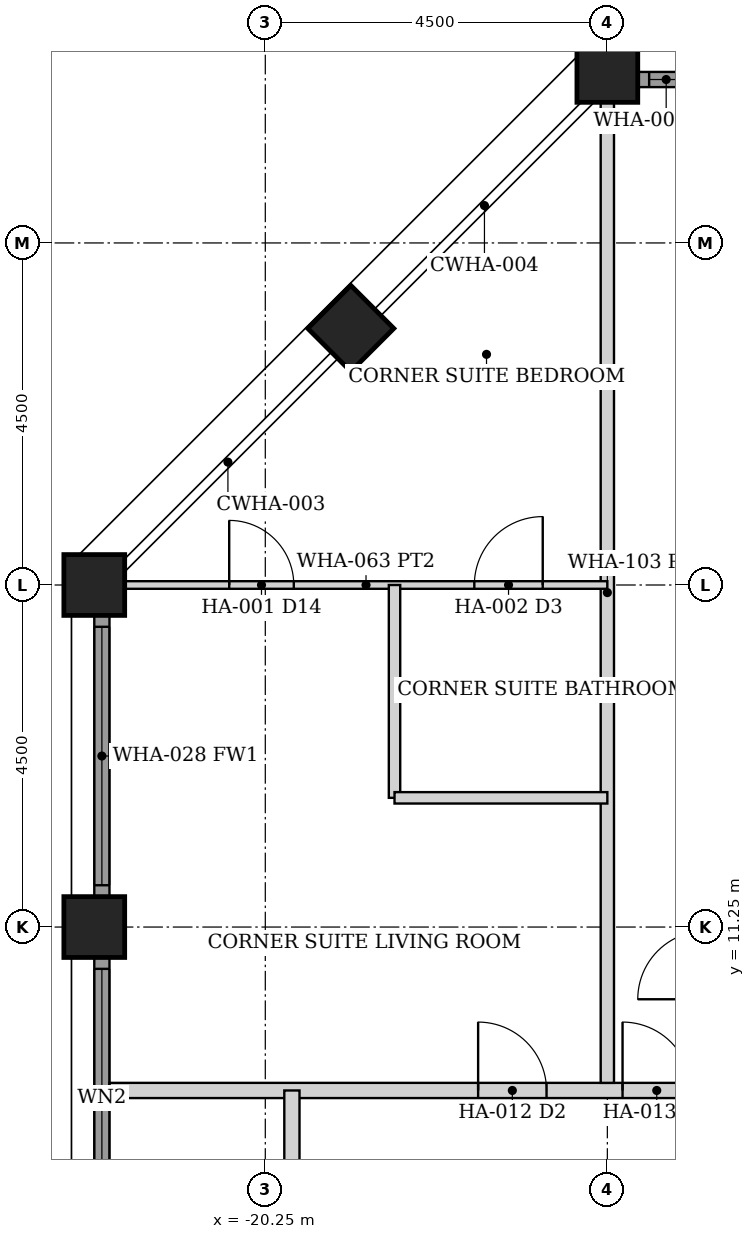
"""IFC4 building model, lengths in metres.
Left out: names, types, materials, properties, quantities, classifications, styles, units other than length and angle.
Written with IfcOpenShell. Run it as: python <this file> out.ifc"""

import sys

from ifc_helpers import new_model, si_unit, direction, frame, frame_2d, origin, origin_2d, place, context, subcontext, project, spatial, rectangle, hollow_rectangle, extrude, element, fill, save


model = new_model("IFC4")
c1 = context("Model", 3, precision=1e-05, world=origin(), true_north=direction((0.0, 1.0)))
c2 = subcontext(c1, "Body", "Model", "MODEL_VIEW")
j1 = project(units=[si_unit("LENGTHUNIT", "METRE"), si_unit("PLANEANGLEUNIT", "RADIAN")], contexts=[c1])
p1 = place(None, origin())
s1 = spatial("IfcSite", under=j1, at=p1, CompositionType="ELEMENT")
p2 = place(p1, origin())
s2 = spatial("IfcBuilding", under=s1, at=p2, CompositionType="ELEMENT")
p3 = place(p2, frame((0.0, 0.0, 118.4)))
s3 = spatial("IfcBuildingStorey", under=s2, at=p3, CompositionType="ELEMENT", Elevation=118.4)
for number, where, z_axis, x_axis in (
    (1, (-15.75, 22.5, 0.0), (0.0, 0.0, 1.0), (0.0, 1.0, 0.0)),
    (2, (-22.5, 11.25, 0.0), (0.0, 0.0, 1.0), (1.0, 0.0, 0.0)),
    (3, (-22.5, 15.75, 0.0), (0.0, 0.0, 1.0), (1.0, 0.0, 0.0)),
    (4, (-19.125, 19.125, 0.0), (0.0, 0.0, 1.0), (0.707, -0.707, 0.0)),
):
    element("IfcColumn", number, at=place(p3, frame(where, z_axis=z_axis, x_axis=x_axis)), inside=s3, PredefinedType="COLUMN", context=c2, shape_type="SweptSolid", body=[
        extrude(hollow_rectangle(XDim=0.8, YDim=0.8, WallThickness=0.06, at=origin_2d()), origin(), (0.0, 0.0, 1.0), 3.6),
    ])
p4 = place(p3, frame((-15.345, 22.4, 0.0), z_axis=(0.0, 0.0, 1.0), x_axis=(1.0, 0.0, 0.0)))
e5 = element("IfcWall", 5, at=p4, inside=s3, PredefinedType="SOLIDWALL", context=c2, shape_type="SweptSolid", body=[
    extrude(rectangle(XDim=3.69, YDim=0.2, at=frame_2d((1.845, 0.0))), origin(), (0.0, 0.0, 1.0), 2.479),
])
p5 = place(p4, frame((0.145, 0.0, 0.3)))
e6 = element("IfcOpeningElement", 6, at=p5, cuts=e5, PredefinedType="OPENING", context=c2, shape_type="SweptSolid", body=[
    extrude(rectangle(XDim=3.4, YDim=2.029, at=frame_2d((1.7, 1.015))), frame((0.0, 0.11, 0.0), z_axis=(0.0, -1.0, 0.0), x_axis=(1.0, 0.0, 0.0)), (0.0, 0.0, 1.0), 0.22),
])
p6 = place(p3, frame((-22.4, 7.155, 0.0), z_axis=(0.0, 0.0, 1.0), x_axis=(0.0, 1.0, 0.0)))
e7 = element("IfcWall", 7, at=p6, inside=s3, PredefinedType="SOLIDWALL", context=c2, shape_type="SweptSolid", body=[
    extrude(rectangle(XDim=3.69, YDim=0.2, at=frame_2d((1.845, 0.0))), origin(), (0.0, 0.0, 1.0), 2.479),
])
p7 = place(p6, frame((0.145, 0.0, 0.3)))
e8 = element("IfcOpeningElement", 8, at=p7, cuts=e7, PredefinedType="OPENING", context=c2, shape_type="SweptSolid", body=[
    extrude(rectangle(XDim=3.4, YDim=2.029, at=frame_2d((1.7, 1.015))), frame((0.0, 0.11, 0.0), z_axis=(0.0, -1.0, 0.0), x_axis=(1.0, 0.0, 0.0)), (0.0, 0.0, 1.0), 0.22),
])
p8 = place(p3, frame((-22.4, 11.655, 0.0), z_axis=(0.0, 0.0, 1.0), x_axis=(0.0, 1.0, 0.0)))
e9 = element("IfcWall", 9, at=p8, inside=s3, PredefinedType="SOLIDWALL", context=c2, shape_type="SweptSolid", body=[
    extrude(rectangle(XDim=3.69, YDim=0.2, at=frame_2d((1.845, 0.0))), origin(), (0.0, 0.0, 1.0), 2.479),
])
p9 = place(p8, frame((0.145, 0.0, 0.3)))
e10 = element("IfcOpeningElement", 10, at=p9, cuts=e9, PredefinedType="OPENING", context=c2, shape_type="SweptSolid", body=[
    extrude(rectangle(XDim=3.4, YDim=2.029, at=frame_2d((1.7, 1.015))), frame((0.0, 0.11, 0.0), z_axis=(0.0, -1.0, 0.0), x_axis=(1.0, 0.0, 0.0)), (0.0, 0.0, 1.0), 0.22),
])
p10 = place(p3, frame((-22.3, 9.1, 0.0), z_axis=(0.0, 0.0, 1.0), x_axis=(1.0, 0.0, 0.0)))
e11 = element("IfcWall", 11, at=p10, inside=s3, PredefinedType="PARTITIONING", context=c2, shape_type="SweptSolid", body=[
    extrude(rectangle(XDim=44.6, YDim=0.2, at=frame_2d((22.3, 0.0))), origin(), (0.0, 0.0, 1.0), 2.473),
])
p11 = place(p10, frame((6.75, 0.0, 0.0)))
e12 = element("IfcOpeningElement", 12, at=p11, cuts=e11, PredefinedType="OPENING", context=c2, shape_type="SweptSolid", body=[
    extrude(rectangle(XDim=0.9, YDim=2.1, at=frame_2d((0.45, 1.05))), frame((0.0, 0.11, 0.0), z_axis=(0.0, -1.0, 0.0), x_axis=(1.0, 0.0, 0.0)), (0.0, 0.0, 1.0), 0.22),
])
p12 = place(p10, frame((11.25, 0.0, 0.0)))
e13 = element("IfcOpeningElement", 13, at=p12, cuts=e11, PredefinedType="OPENING", context=c2, shape_type="SweptSolid", body=[
    extrude(rectangle(XDim=0.9, YDim=2.1, at=frame_2d((0.45, 1.05))), frame((0.0, 0.11, 0.0), z_axis=(0.0, -1.0, 0.0), x_axis=(1.0, 0.0, 0.0)), (0.0, 0.0, 1.0), 0.22),
])
p13 = place(p10, frame((15.75, 0.0, 0.0)))
e14 = element("IfcOpeningElement", 14, at=p13, cuts=e11, PredefinedType="OPENING", context=c2, shape_type="SweptSolid", body=[
    extrude(rectangle(XDim=0.9, YDim=2.1, at=frame_2d((0.45, 1.05))), frame((0.0, 0.11, 0.0), z_axis=(0.0, -1.0, 0.0), x_axis=(1.0, 0.0, 0.0)), (0.0, 0.0, 1.0), 0.22),
])
p14 = place(p10, frame((20.25, 0.0, 0.0)))
e15 = element("IfcOpeningElement", 15, at=p14, cuts=e11, PredefinedType="OPENING", context=c2, shape_type="SweptSolid", body=[
    extrude(rectangle(XDim=0.9, YDim=2.1, at=frame_2d((0.45, 1.05))), frame((0.0, 0.11, 0.0), z_axis=(0.0, -1.0, 0.0), x_axis=(1.0, 0.0, 0.0)), (0.0, 0.0, 1.0), 0.22),
])
p15 = place(p10, frame((24.75, 0.0, 0.0)))
e16 = element("IfcOpeningElement", 16, at=p15, cuts=e11, PredefinedType="OPENING", context=c2, shape_type="SweptSolid", body=[
    extrude(rectangle(XDim=0.9, YDim=2.1, at=frame_2d((0.45, 1.05))), frame((0.0, 0.11, 0.0), z_axis=(0.0, -1.0, 0.0), x_axis=(1.0, 0.0, 0.0)), (0.0, 0.0, 1.0), 0.22),
])
p16 = place(p10, frame((29.25, 0.0, 0.0)))
e17 = element("IfcOpeningElement", 17, at=p16, cuts=e11, PredefinedType="OPENING", context=c2, shape_type="SweptSolid", body=[
    extrude(rectangle(XDim=0.9, YDim=2.1, at=frame_2d((0.45, 1.05))), frame((0.0, 0.11, 0.0), z_axis=(0.0, -1.0, 0.0), x_axis=(1.0, 0.0, 0.0)), (0.0, 0.0, 1.0), 0.22),
])
p17 = place(p10, frame((33.75, 0.0, 0.0)))
e18 = element("IfcOpeningElement", 18, at=p17, cuts=e11, PredefinedType="OPENING", context=c2, shape_type="SweptSolid", body=[
    extrude(rectangle(XDim=0.9, YDim=2.1, at=frame_2d((0.45, 1.05))), frame((0.0, 0.11, 0.0), z_axis=(0.0, -1.0, 0.0), x_axis=(1.0, 0.0, 0.0)), (0.0, 0.0, 1.0), 0.22),
])
p18 = place(p10, frame((38.85, 0.0, 0.0)))
e19 = element("IfcOpeningElement", 19, at=p18, cuts=e11, PredefinedType="OPENING", context=c2, shape_type="SweptSolid", body=[
    extrude(rectangle(XDim=0.9, YDim=2.1, at=frame_2d((0.45, 1.05))), frame((0.0, 0.11, 0.0), z_axis=(0.0, -1.0, 0.0), x_axis=(1.0, 0.0, 0.0)), (0.0, 0.0, 1.0), 0.22),
])
p19 = place(p10, frame((4.85, 0.0, 0.0)))
e20 = element("IfcOpeningElement", 20, at=p19, cuts=e11, PredefinedType="OPENING", context=c2, shape_type="SweptSolid", body=[
    extrude(rectangle(XDim=0.9, YDim=2.1, at=frame_2d((0.45, 1.05))), frame((0.0, 0.11, 0.0), z_axis=(0.0, -1.0, 0.0), x_axis=(1.0, 0.0, 0.0)), (0.0, 0.0, 1.0), 0.22),
])
p20 = place(p3, frame((-19.9, -9.1, 0.0), z_axis=(0.0, 0.0, 1.0), x_axis=(0.0, 1.0, 0.0)))
e21 = element("IfcWall", 21, at=p20, inside=s3, PredefinedType="PARTITIONING", context=c2, shape_type="SweptSolid", body=[
    extrude(rectangle(XDim=18.2, YDim=0.2, at=frame_2d((9.1, 0.0))), origin(), (0.0, 0.0, 1.0), 2.473),
])
p21 = place(p20, frame((8.6, 0.0, 0.0)))
e22 = element("IfcOpeningElement", 22, at=p21, cuts=e21, PredefinedType="OPENING", context=c2, shape_type="SweptSolid", body=[
    extrude(rectangle(XDim=1.0, YDim=2.1, at=frame_2d((0.5, 1.05))), frame((0.0, 0.11, 0.0), z_axis=(0.0, -1.0, 0.0), x_axis=(1.0, 0.0, 0.0)), (0.0, 0.0, 1.0), 0.22),
])
p22 = place(p3, frame((-15.75, 9.2, 0.0), z_axis=(0.0, 0.0, 1.0), x_axis=(0.0, 1.0, 0.0)))
e23 = element("IfcWall", 23, at=p22, inside=s3, PredefinedType="PARTITIONING", context=c2, shape_type="SweptSolid", body=[
    extrude(rectangle(XDim=12.9, YDim=0.175, at=frame_2d((6.45, 0.0))), origin(), (0.0, 0.0, 1.0), 2.473),
])
p23 = place(p3, frame((-22.1, 15.75, 0.0), z_axis=(0.0, 0.0, 1.0), x_axis=(1.0, 0.0, 0.0)))
e24 = element("IfcWall", 24, at=p23, inside=s3, PredefinedType="PARTITIONING", context=c2, shape_type="SweptSolid", body=[
    extrude(rectangle(XDim=6.35, YDim=0.1, at=frame_2d((3.175, 0.0))), origin(), (0.0, 0.0, 1.0), 2.473),
])
p24 = place(p23, frame((1.375, 0.0, 0.0)))
e25 = element("IfcOpeningElement", 25, at=p24, cuts=e24, PredefinedType="OPENING", context=c2, shape_type="SweptSolid", body=[
    extrude(rectangle(XDim=0.85, YDim=2.1, at=frame_2d((0.425, 1.05))), frame((0.0, 0.06, 0.0), z_axis=(0.0, -1.0, 0.0), x_axis=(1.0, 0.0, 0.0)), (0.0, 0.0, 1.0), 0.12),
])
p25 = place(p23, frame((4.6, 0.0, 0.0)))
e26 = element("IfcOpeningElement", 26, at=p25, cuts=e24, PredefinedType="OPENING", context=c2, shape_type="SweptSolid", body=[
    extrude(rectangle(XDim=0.9, YDim=2.1, at=frame_2d((0.45, 1.05))), frame((0.0, 0.06, 0.0), z_axis=(0.0, -1.0, 0.0), x_axis=(1.0, 0.0, 0.0)), (0.0, 0.0, 1.0), 0.12),
])
for number, where, z_axis, x_axis in (
    (27, (-18.55, 12.95, 0.0), (0.0, 0.0, 1.0), (0.0, 1.0, 0.0)),
    (28, (-18.55, 12.95, 0.0), (0.0, 0.0, 1.0), (1.0, 0.0, 0.0)),
):
    element("IfcWall", number, at=place(p3, frame(where, z_axis=z_axis, x_axis=x_axis)), inside=s3, PredefinedType="PARTITIONING", context=c2, shape_type="SweptSolid", body=[
        extrude(rectangle(XDim=2.8, YDim=0.15, at=frame_2d((1.4, 0.0))), origin(), (0.0, 0.0, 1.0), 2.473),
    ])
p26 = place(p5, origin())
e29 = element("IfcWindow", 29, at=p26, inside=s3, PartitioningType="SINGLE_PANEL", PredefinedType="WINDOW", context=c2, shape_type="SweptSolid", body=[
    extrude(rectangle(XDim=3.4, YDim=2.029, at=frame_2d((1.7, 1.015))), frame((0.0, 0.03, 0.0), z_axis=(0.0, -1.0, 0.0), x_axis=(1.0, 0.0, 0.0)), (0.0, 0.0, 1.0), 0.06),
])
fill(e6, e29)
p27 = place(p7, origin())
e30 = element("IfcWindow", 30, at=p27, inside=s3, PartitioningType="SINGLE_PANEL", PredefinedType="WINDOW", context=c2, shape_type="SweptSolid", body=[
    extrude(rectangle(XDim=3.4, YDim=2.029, at=frame_2d((1.7, 1.015))), frame((0.0, 0.03, 0.0), z_axis=(0.0, -1.0, 0.0), x_axis=(1.0, 0.0, 0.0)), (0.0, 0.0, 1.0), 0.06),
])
fill(e8, e30)
p28 = place(p9, origin())
e31 = element("IfcWindow", 31, at=p28, inside=s3, PartitioningType="SINGLE_PANEL", PredefinedType="WINDOW", context=c2, shape_type="SweptSolid", body=[
    extrude(rectangle(XDim=3.4, YDim=2.029, at=frame_2d((1.7, 1.015))), frame((0.0, 0.03, 0.0), z_axis=(0.0, -1.0, 0.0), x_axis=(1.0, 0.0, 0.0)), (0.0, 0.0, 1.0), 0.06),
])
fill(e10, e31)
p29 = place(p11, origin())
e32 = element("IfcDoor", 32, at=p29, inside=s3, OperationType="SINGLE_SWING_LEFT", PredefinedType="DOOR", context=c2, shape_type="SweptSolid", body=[
    extrude(rectangle(XDim=0.9, YDim=2.1, at=frame_2d((0.45, 1.05))), frame((0.0, 0.025, 0.0), z_axis=(0.0, -1.0, 0.0), x_axis=(1.0, 0.0, 0.0)), (0.0, 0.0, 1.0), 0.05),
])
fill(e12, e32)
p30 = place(p19, origin())
e33 = element("IfcDoor", 33, at=p30, inside=s3, OperationType="SINGLE_SWING_LEFT", PredefinedType="DOOR", context=c2, shape_type="SweptSolid", body=[
    extrude(rectangle(XDim=0.9, YDim=2.1, at=frame_2d((0.45, 1.05))), frame((0.0, 0.025, 0.0), z_axis=(0.0, -1.0, 0.0), x_axis=(1.0, 0.0, 0.0)), (0.0, 0.0, 1.0), 0.05),
])
fill(e20, e33)
p31 = place(p24, origin())
e34 = element("IfcDoor", 34, at=p31, inside=s3, OperationType="SINGLE_SWING_LEFT", PredefinedType="DOOR", context=c2, shape_type="SweptSolid", body=[
    extrude(rectangle(XDim=0.85, YDim=2.1, at=frame_2d((0.425, 1.05))), frame((0.0, 0.025, 0.0), z_axis=(0.0, -1.0, 0.0), x_axis=(1.0, 0.0, 0.0)), (0.0, 0.0, 1.0), 0.05),
])
fill(e25, e34)
p32 = place(p25, origin())
e35 = element("IfcDoor", 35, at=p32, inside=s3, OperationType="SINGLE_SWING_RIGHT", PredefinedType="DOOR", context=c2, shape_type="SweptSolid", body=[
    extrude(rectangle(XDim=0.9, YDim=2.1, at=frame_2d((0.45, 1.05))), frame((0.0, 0.025, 0.0), z_axis=(0.0, -1.0, 0.0), x_axis=(1.0, 0.0, 0.0)), (0.0, 0.0, 1.0), 0.05),
])
fill(e26, e35)
save(model, sys.argv[1])
